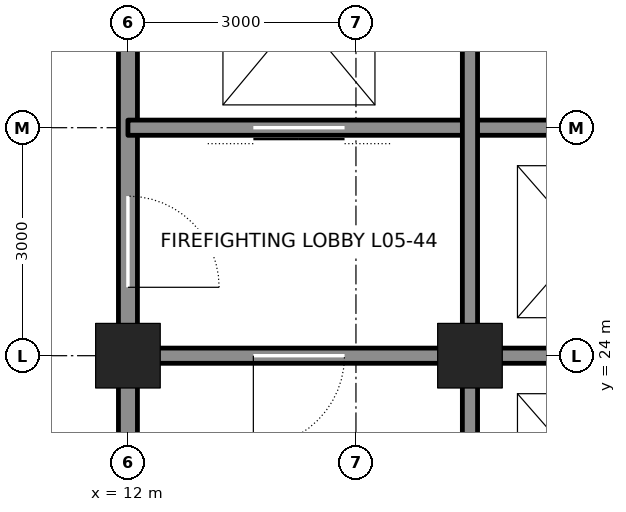
"""IFC4 building model, lengths in metres.
Left out: names, types, materials, properties, quantities, classifications, styles, units other than length and angle.
Written with IfcOpenShell. Run it as: python <this file> out.ifc"""

import sys

from ifc_helpers import new_model, si_unit, direction, frame, frame_2d, origin, origin_2d, place, context, subcontext, project, spatial, rectangle, hollow_rectangle, extrude, element, fill, save


model = new_model("IFC4")
c1 = context("Model", 3, precision=1e-05, world=origin(), true_north=direction((0.0, 1.0)))
c2 = subcontext(c1, "Body", "Model", "MODEL_VIEW")
j1 = project(units=[si_unit("LENGTHUNIT", "METRE"), si_unit("PLANEANGLEUNIT", "RADIAN")], contexts=[c1])
p1 = place(None, origin())
s1 = spatial("IfcSite", under=j1, at=p1, CompositionType="ELEMENT")
p2 = place(p1, origin())
s2 = spatial("IfcBuilding", under=s1, at=p2, CompositionType="ELEMENT")
p3 = place(p2, frame((0.0, 0.0, 28.8)))
s3 = spatial("IfcBuildingStorey", under=s2, at=p3, CompositionType="ELEMENT", Elevation=28.8)
for number, where, z_axis, x_axis in (
    (1, (12.0, 24.0, 0.0), (0.0, 0.0, 1.0), (1.0, 0.0, 0.0)),
    (2, (16.5, 24.0, 0.0), (0.0, 0.0, 1.0), (1.0, 0.0, 0.0)),
):
    element("IfcColumn", number, at=place(p3, frame(where, z_axis=z_axis, x_axis=x_axis)), inside=s3, PredefinedType="COLUMN", context=c2, shape_type="SweptSolid", body=[
        extrude(hollow_rectangle(XDim=0.85, YDim=0.85, WallThickness=0.085, at=origin_2d()), origin(), (0.0, 0.0, 1.0), 4.5),
    ])
p4 = place(p3, frame((12.0, 21.25, 0.0), z_axis=(0.0, 0.0, 1.0), x_axis=(0.0, 1.0, 0.0)))
e3 = element("IfcWall", 3, at=p4, inside=s3, PredefinedType="SOLIDWALL", context=c2, shape_type="SweptSolid", body=[
    extrude(rectangle(XDim=2.5, YDim=0.25, at=frame_2d((1.25, 0.0))), origin(), (0.0, 0.0, 1.0), 3.113),
])
p5 = place(p3, frame((12.0, 24.25, 0.0), z_axis=(0.0, 0.0, 1.0), x_axis=(0.0, 1.0, 0.0)))
e4 = element("IfcWall", 4, at=p5, inside=s3, PredefinedType="SOLIDWALL", context=c2, shape_type="SweptSolid", body=[
    extrude(rectangle(XDim=8.5, YDim=0.25, at=frame_2d((4.25, 0.0))), origin(), (0.0, 0.0, 1.0), 3.113),
])
p6 = place(p5, frame((0.65, 0.0, 0.0)))
e5 = element("IfcOpeningElement", 5, at=p6, cuts=e4, PredefinedType="OPENING", context=c2, shape_type="SweptSolid", body=[
    extrude(rectangle(XDim=1.2, YDim=2.1, at=frame_2d((0.6, 1.05))), frame((0.0, 0.135, 0.0), z_axis=(0.0, -1.0, 0.0), x_axis=(1.0, 0.0, 0.0)), (0.0, 0.0, 1.0), 0.27),
])
p7 = place(p5, frame((6.875, 0.0, 0.0)))
e6 = element("IfcOpeningElement", 6, at=p7, cuts=e4, PredefinedType="OPENING", context=c2, shape_type="SweptSolid", body=[
    extrude(rectangle(XDim=0.75, YDim=2.1, at=frame_2d((0.375, 1.05))), frame((0.0, 0.135, 0.0), z_axis=(0.0, -1.0, 0.0), x_axis=(1.0, 0.0, 0.0)), (0.0, 0.0, 1.0), 0.27),
])
p8 = place(p3, frame((12.25, 24.0, 0.0), z_axis=(0.0, 0.0, 1.0), x_axis=(1.0, 0.0, 0.0)))
e7 = element("IfcWall", 7, at=p8, inside=s3, PredefinedType="SOLIDWALL", context=c2, shape_type="SweptSolid", body=[
    extrude(rectangle(XDim=4.0, YDim=0.2, at=frame_2d((2.0, 0.0))), origin(), (0.0, 0.0, 1.0), 3.39),
])
p9 = place(p8, frame((1.4, 0.0, 0.0)))
e8 = element("IfcOpeningElement", 8, at=p9, cuts=e7, PredefinedType="OPENING", context=c2, shape_type="SweptSolid", body=[
    extrude(rectangle(XDim=1.2, YDim=2.1, at=frame_2d((0.6, 1.05))), frame((0.0, 0.11, 0.0), z_axis=(0.0, -1.0, 0.0), x_axis=(1.0, 0.0, 0.0)), (0.0, 0.0, 1.0), 0.22),
])
p10 = place(p3, frame((16.75, 24.0, 0.0), z_axis=(0.0, 0.0, 1.0), x_axis=(1.0, 0.0, 0.0)))
e9 = element("IfcWall", 9, at=p10, inside=s3, PredefinedType="SOLIDWALL", context=c2, shape_type="SweptSolid", body=[
    extrude(rectangle(XDim=2.75, YDim=0.2, at=frame_2d((1.375, 0.0))), origin(), (0.0, 0.0, 1.0), 3.39),
])
p11 = place(p3, frame((12.0, 27.0, 0.0), z_axis=(0.0, 0.0, 1.0), x_axis=(1.0, 0.0, 0.0)))
e10 = element("IfcWall", 10, at=p11, inside=s3, PredefinedType="SOLIDWALL", context=c2, shape_type="SweptSolid", body=[
    extrude(rectangle(XDim=7.5, YDim=0.2, at=frame_2d((3.75, 0.0))), origin(), (0.0, 0.0, 1.0), 4.34),
])
p12 = place(p11, frame((1.65, 0.0, 0.0)))
e11 = element("IfcOpeningElement", 11, at=p12, cuts=e10, PredefinedType="OPENING", context=c2, shape_type="SweptSolid", body=[
    extrude(rectangle(XDim=1.2, YDim=2.1, at=frame_2d((0.6, 1.05))), frame((0.0, 0.11, 0.0), z_axis=(0.0, -1.0, 0.0), x_axis=(1.0, 0.0, 0.0)), (0.0, 0.0, 1.0), 0.22),
])
p13 = place(p3, frame((16.5, 21.25, 0.0), z_axis=(0.0, 0.0, 1.0), x_axis=(0.0, 1.0, 0.0)))
e12 = element("IfcWall", 12, at=p13, inside=s3, PredefinedType="SOLIDWALL", context=c2, shape_type="SweptSolid", body=[
    extrude(rectangle(XDim=2.5, YDim=0.2, at=frame_2d((1.25, 0.0))), origin(), (0.0, 0.0, 1.0), 3.413),
])
p14 = place(p3, frame((16.5, 24.25, 0.0), z_axis=(0.0, 0.0, 1.0), x_axis=(0.0, 1.0, 0.0)))
e13 = element("IfcWall", 13, at=p14, inside=s3, PredefinedType="SOLIDWALL", context=c2, shape_type="SweptSolid", body=[
    extrude(rectangle(XDim=8.5, YDim=0.2, at=frame_2d((4.25, 0.0))), origin(), (0.0, 0.0, 1.0), 3.413),
])
p15 = place(p9, frame((1.2, 0.0, 0.0), z_axis=(0.0, 0.0, 1.0), x_axis=(-1.0, 0.0, 0.0)))
e14 = element("IfcDoor", 14, at=p15, inside=s3, OperationType="SINGLE_SWING_RIGHT", PredefinedType="DOOR", context=c2, shape_type="SweptSolid", body=[
    extrude(rectangle(XDim=1.2, YDim=2.1, at=frame_2d((0.6, 1.05))), frame((0.0, 0.025, 0.0), z_axis=(0.0, -1.0, 0.0), x_axis=(1.0, 0.0, 0.0)), (0.0, 0.0, 1.0), 0.05),
])
fill(e8, e14)
p16 = place(p6, frame((1.2, 0.0, 0.0), z_axis=(0.0, 0.0, 1.0), x_axis=(-1.0, 0.0, 0.0)))
e15 = element("IfcDoor", 15, at=p16, inside=s3, OperationType="SINGLE_SWING_RIGHT", PredefinedType="DOOR", context=c2, shape_type="SweptSolid", body=[
    extrude(rectangle(XDim=1.2, YDim=2.1, at=frame_2d((0.6, 1.05))), frame((0.0, 0.025, 0.0), z_axis=(0.0, -1.0, 0.0), x_axis=(1.0, 0.0, 0.0)), (0.0, 0.0, 1.0), 0.05),
])
fill(e5, e15)
p17 = place(p12, origin())
e16 = element("IfcDoor", 16, at=p17, inside=s3, OperationType="DOUBLE_DOOR_SLIDING", PredefinedType="DOOR", context=c2, shape_type="SweptSolid", body=[
    extrude(rectangle(XDim=1.2, YDim=2.1, at=frame_2d((0.6, 1.05))), frame((0.0, 0.025, 0.0), z_axis=(0.0, -1.0, 0.0), x_axis=(1.0, 0.0, 0.0)), (0.0, 0.0, 1.0), 0.05),
])
fill(e11, e16)
save(model, sys.argv[1])
